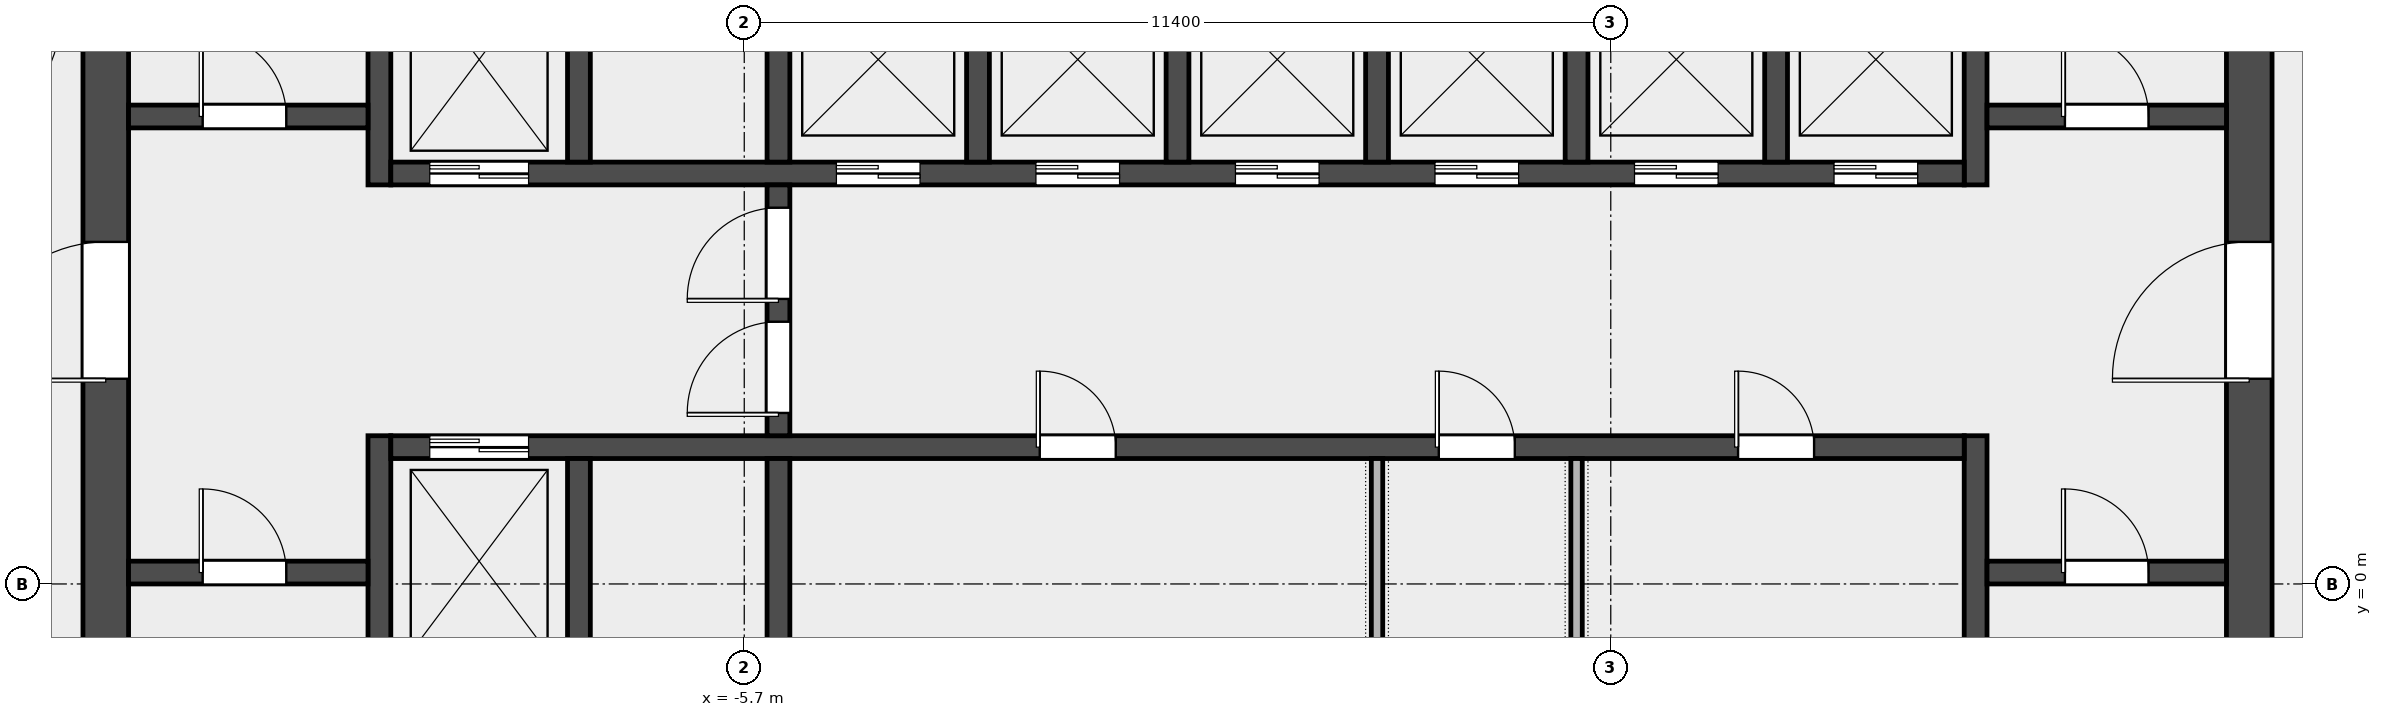
"""IFC4 building model, lengths in metres.
Left out: names, types, materials, properties, quantities, classifications, styles, units other than length and angle.
Written with IfcOpenShell. Run it as: python <this file> out.ifc"""

import sys

from ifc_helpers import new_model, si_unit, direction, frame, frame_2d, origin, place, context, subcontext, project, spatial, rectangle, extrude, element, fill, save


model = new_model("IFC4")
c1 = context("Model", 3, precision=1e-05, world=origin(), true_north=direction((0.0, 1.0)))
c2 = subcontext(c1, "Body", "Model", "MODEL_VIEW")
j1 = project(units=[si_unit("LENGTHUNIT", "METRE"), si_unit("PLANEANGLEUNIT", "RADIAN")], contexts=[c1])
p1 = place(None, origin())
s1 = spatial("IfcSite", under=j1, at=p1, CompositionType="ELEMENT")
p2 = place(p1, origin())
s2 = spatial("IfcBuilding", under=s1, at=p2, CompositionType="ELEMENT")
p3 = place(p2, frame((0.0, 0.0, 251.0)))
s3 = spatial("IfcBuildingStorey", under=s2, at=p3, CompositionType="ELEMENT", Elevation=251.0)
p4 = place(p3, frame((-14.1, -6.6, 0.0), z_axis=(0.0, 0.0, 1.0), x_axis=(0.0, 1.0, 0.0)))
e1 = element("IfcWall", 1, at=p4, inside=s3, PredefinedType="SHEAR", context=c2, shape_type="SweptSolid", body=[
    extrude(rectangle(XDim=19.5, YDim=0.6, at=frame_2d((9.75, 0.0))), origin(), (0.0, 0.0, 1.0), 3.7),
])
p5 = place(p4, frame((9.3, 0.0, 0.0)))
e2 = element("IfcOpeningElement", 2, at=p5, cuts=e1, PredefinedType="OPENING", context=c2, shape_type="SweptSolid", body=[
    extrude(rectangle(XDim=1.8, YDim=2.1, at=frame_2d((0.9, 1.05))), frame((0.0, 0.312, 0.0), z_axis=(0.0, -1.0, 0.0), x_axis=(1.0, 0.0, 0.0)), (0.0, 0.0, 1.0), 0.624),
])
p6 = place(p3, frame((14.1, -6.6, 0.0), z_axis=(0.0, 0.0, 1.0), x_axis=(0.0, 1.0, 0.0)))
e3 = element("IfcWall", 3, at=p6, inside=s3, PredefinedType="SHEAR", context=c2, shape_type="SweptSolid", body=[
    extrude(rectangle(XDim=19.5, YDim=0.6, at=frame_2d((9.75, 0.0))), origin(), (0.0, 0.0, 1.0), 3.7),
])
p7 = place(p6, frame((9.3, 0.0, 0.0)))
e4 = element("IfcOpeningElement", 4, at=p7, cuts=e3, PredefinedType="OPENING", context=c2, shape_type="SweptSolid", body=[
    extrude(rectangle(XDim=1.8, YDim=2.1, at=frame_2d((0.9, 1.05))), frame((0.0, 0.312, 0.0), z_axis=(0.0, -1.0, 0.0), x_axis=(1.0, 0.0, 0.0)), (0.0, 0.0, 1.0), 0.624),
])
p8 = place(p3, frame((-10.5, -6.6, 0.0), z_axis=(0.0, 0.0, 1.0), x_axis=(0.0, 1.0, 0.0)))
e5 = element("IfcWall", 5, at=p8, inside=s3, PredefinedType="SHEAR", context=c2, shape_type="SweptSolid", body=[
    extrude(rectangle(XDim=8.55, YDim=0.3, at=frame_2d((4.275, 0.0))), origin(), (0.0, 0.0, 1.0), 3.7),
])
p9 = place(p3, frame((-10.5, 5.25, 0.0), z_axis=(0.0, 0.0, 1.0), x_axis=(0.0, 1.0, 0.0)))
e6 = element("IfcWall", 6, at=p9, inside=s3, PredefinedType="SHEAR", context=c2, shape_type="SweptSolid", body=[
    extrude(rectangle(XDim=7.65, YDim=0.3, at=frame_2d((3.825, 0.0))), origin(), (0.0, 0.0, 1.0), 3.7),
])
p10 = place(p3, frame((10.5, -6.6, 0.0), z_axis=(0.0, 0.0, 1.0), x_axis=(0.0, 1.0, 0.0)))
e7 = element("IfcWall", 7, at=p10, inside=s3, PredefinedType="SHEAR", context=c2, shape_type="SweptSolid", body=[
    extrude(rectangle(XDim=8.55, YDim=0.3, at=frame_2d((4.275, 0.0))), origin(), (0.0, 0.0, 1.0), 3.7),
])
p11 = place(p3, frame((10.5, 5.25, 0.0), z_axis=(0.0, 0.0, 1.0), x_axis=(0.0, 1.0, 0.0)))
e8 = element("IfcWall", 8, at=p11, inside=s3, PredefinedType="SHEAR", context=c2, shape_type="SweptSolid", body=[
    extrude(rectangle(XDim=7.65, YDim=0.3, at=frame_2d((3.825, 0.0))), origin(), (0.0, 0.0, 1.0), 3.7),
])
p12 = place(p3, frame((-13.8, 0.15, 0.0), z_axis=(0.0, 0.0, 1.0), x_axis=(1.0, 0.0, 0.0)))
e9 = element("IfcWall", 9, at=p12, inside=s3, PredefinedType="SOLIDWALL", context=c2, shape_type="SweptSolid", body=[
    extrude(rectangle(XDim=3.15, YDim=0.3, at=frame_2d((1.575, 0.0))), origin(), (0.0, 0.0, 1.0), 3.7),
])
p13 = place(p12, frame((0.975, 0.0, 0.0)))
e10 = element("IfcOpeningElement", 10, at=p13, cuts=e9, PredefinedType="OPENING", context=c2, shape_type="SweptSolid", body=[
    extrude(rectangle(XDim=1.1, YDim=2.1, at=frame_2d((0.55, 1.05))), frame((0.0, 0.162, 0.0), z_axis=(0.0, -1.0, 0.0), x_axis=(1.0, 0.0, 0.0)), (0.0, 0.0, 1.0), 0.324),
])
p14 = place(p3, frame((-13.8, 6.15, 0.0), z_axis=(0.0, 0.0, 1.0), x_axis=(1.0, 0.0, 0.0)))
e11 = element("IfcWall", 11, at=p14, inside=s3, PredefinedType="SOLIDWALL", context=c2, shape_type="SweptSolid", body=[
    extrude(rectangle(XDim=3.15, YDim=0.3, at=frame_2d((1.575, 0.0))), origin(), (0.0, 0.0, 1.0), 3.7),
])
p15 = place(p14, frame((0.975, 0.0, 0.0)))
e12 = element("IfcOpeningElement", 12, at=p15, cuts=e11, PredefinedType="OPENING", context=c2, shape_type="SweptSolid", body=[
    extrude(rectangle(XDim=1.1, YDim=2.1, at=frame_2d((0.55, 1.05))), frame((0.0, 0.162, 0.0), z_axis=(0.0, -1.0, 0.0), x_axis=(1.0, 0.0, 0.0)), (0.0, 0.0, 1.0), 0.324),
])
p16 = place(p3, frame((10.65, 0.15, 0.0), z_axis=(0.0, 0.0, 1.0), x_axis=(1.0, 0.0, 0.0)))
e13 = element("IfcWall", 13, at=p16, inside=s3, PredefinedType="SOLIDWALL", context=c2, shape_type="SweptSolid", body=[
    extrude(rectangle(XDim=3.15, YDim=0.3, at=frame_2d((1.575, 0.0))), origin(), (0.0, 0.0, 1.0), 3.7),
])
p17 = place(p16, frame((1.025, 0.0, 0.0)))
e14 = element("IfcOpeningElement", 14, at=p17, cuts=e13, PredefinedType="OPENING", context=c2, shape_type="SweptSolid", body=[
    extrude(rectangle(XDim=1.1, YDim=2.1, at=frame_2d((0.55, 1.05))), frame((0.0, 0.162, 0.0), z_axis=(0.0, -1.0, 0.0), x_axis=(1.0, 0.0, 0.0)), (0.0, 0.0, 1.0), 0.324),
])
p18 = place(p3, frame((10.65, 6.15, 0.0), z_axis=(0.0, 0.0, 1.0), x_axis=(1.0, 0.0, 0.0)))
e15 = element("IfcWall", 15, at=p18, inside=s3, PredefinedType="SOLIDWALL", context=c2, shape_type="SweptSolid", body=[
    extrude(rectangle(XDim=3.15, YDim=0.3, at=frame_2d((1.575, 0.0))), origin(), (0.0, 0.0, 1.0), 3.7),
])
p19 = place(p18, frame((1.025, 0.0, 0.0)))
e16 = element("IfcOpeningElement", 16, at=p19, cuts=e15, PredefinedType="OPENING", context=c2, shape_type="SweptSolid", body=[
    extrude(rectangle(XDim=1.1, YDim=2.1, at=frame_2d((0.55, 1.05))), frame((0.0, 0.162, 0.0), z_axis=(0.0, -1.0, 0.0), x_axis=(1.0, 0.0, 0.0)), (0.0, 0.0, 1.0), 0.324),
])
p20 = place(p3, frame((-10.35, 1.8, 0.0), z_axis=(0.0, 0.0, 1.0), x_axis=(1.0, 0.0, 0.0)))
e17 = element("IfcWall", 17, at=p20, inside=s3, PredefinedType="SOLIDWALL", context=c2, shape_type="SweptSolid", body=[
    extrude(rectangle(XDim=20.7, YDim=0.3, at=frame_2d((10.35, 0.0))), origin(), (0.0, 0.0, 1.0), 3.7),
])
p21 = place(p20, frame((0.512, 0.0, 0.0)))
e18 = element("IfcOpeningElement", 18, at=p21, cuts=e17, PredefinedType="OPENING", context=c2, shape_type="SweptSolid", body=[
    extrude(rectangle(XDim=1.3, YDim=2.1, at=frame_2d((0.65, 1.05))), frame((0.0, 0.162, 0.0), z_axis=(0.0, -1.0, 0.0), x_axis=(1.0, 0.0, 0.0)), (0.0, 0.0, 1.0), 0.324),
])
p22 = place(p20, frame((8.538, 0.0, 0.0)))
e19 = element("IfcOpeningElement", 19, at=p22, cuts=e17, PredefinedType="OPENING", context=c2, shape_type="SweptSolid", body=[
    extrude(rectangle(XDim=1.0, YDim=2.1, at=frame_2d((0.5, 1.05))), frame((0.0, 0.162, 0.0), z_axis=(0.0, -1.0, 0.0), x_axis=(1.0, 0.0, 0.0)), (0.0, 0.0, 1.0), 0.324),
])
p23 = place(p20, frame((13.788, 0.0, 0.0)))
e20 = element("IfcOpeningElement", 20, at=p23, cuts=e17, PredefinedType="OPENING", context=c2, shape_type="SweptSolid", body=[
    extrude(rectangle(XDim=1.0, YDim=2.1, at=frame_2d((0.5, 1.05))), frame((0.0, 0.162, 0.0), z_axis=(0.0, -1.0, 0.0), x_axis=(1.0, 0.0, 0.0)), (0.0, 0.0, 1.0), 0.324),
])
p24 = place(p20, frame((17.725, 0.0, 0.0)))
e21 = element("IfcOpeningElement", 21, at=p24, cuts=e17, PredefinedType="OPENING", context=c2, shape_type="SweptSolid", body=[
    extrude(rectangle(XDim=1.0, YDim=2.1, at=frame_2d((0.5, 1.05))), frame((0.0, 0.162, 0.0), z_axis=(0.0, -1.0, 0.0), x_axis=(1.0, 0.0, 0.0)), (0.0, 0.0, 1.0), 0.324),
])
p25 = place(p3, frame((-10.35, 5.4, 0.0), z_axis=(0.0, 0.0, 1.0), x_axis=(1.0, 0.0, 0.0)))
e22 = element("IfcWall", 22, at=p25, inside=s3, PredefinedType="SOLIDWALL", context=c2, shape_type="SweptSolid", body=[
    extrude(rectangle(XDim=20.7, YDim=0.3, at=frame_2d((10.35, 0.0))), origin(), (0.0, 0.0, 1.0), 3.7),
])
p26 = place(p25, frame((0.512, 0.0, 0.0)))
e23 = element("IfcOpeningElement", 23, at=p26, cuts=e22, PredefinedType="OPENING", context=c2, shape_type="SweptSolid", body=[
    extrude(rectangle(XDim=1.3, YDim=2.1, at=frame_2d((0.65, 1.05))), frame((0.0, 0.162, 0.0), z_axis=(0.0, -1.0, 0.0), x_axis=(1.0, 0.0, 0.0)), (0.0, 0.0, 1.0), 0.324),
])
p27 = place(p25, frame((5.863, 0.0, 0.0)))
e24 = element("IfcOpeningElement", 24, at=p27, cuts=e22, PredefinedType="OPENING", context=c2, shape_type="SweptSolid", body=[
    extrude(rectangle(XDim=1.1, YDim=2.1, at=frame_2d((0.55, 1.05))), frame((0.0, 0.162, 0.0), z_axis=(0.0, -1.0, 0.0), x_axis=(1.0, 0.0, 0.0)), (0.0, 0.0, 1.0), 0.324),
])
p28 = place(p25, frame((8.488, 0.0, 0.0)))
e25 = element("IfcOpeningElement", 25, at=p28, cuts=e22, PredefinedType="OPENING", context=c2, shape_type="SweptSolid", body=[
    extrude(rectangle(XDim=1.1, YDim=2.1, at=frame_2d((0.55, 1.05))), frame((0.0, 0.162, 0.0), z_axis=(0.0, -1.0, 0.0), x_axis=(1.0, 0.0, 0.0)), (0.0, 0.0, 1.0), 0.324),
])
p29 = place(p25, frame((11.113, 0.0, 0.0)))
e26 = element("IfcOpeningElement", 26, at=p29, cuts=e22, PredefinedType="OPENING", context=c2, shape_type="SweptSolid", body=[
    extrude(rectangle(XDim=1.1, YDim=2.1, at=frame_2d((0.55, 1.05))), frame((0.0, 0.162, 0.0), z_axis=(0.0, -1.0, 0.0), x_axis=(1.0, 0.0, 0.0)), (0.0, 0.0, 1.0), 0.324),
])
p30 = place(p25, frame((13.738, 0.0, 0.0)))
e27 = element("IfcOpeningElement", 27, at=p30, cuts=e22, PredefinedType="OPENING", context=c2, shape_type="SweptSolid", body=[
    extrude(rectangle(XDim=1.1, YDim=2.1, at=frame_2d((0.55, 1.05))), frame((0.0, 0.162, 0.0), z_axis=(0.0, -1.0, 0.0), x_axis=(1.0, 0.0, 0.0)), (0.0, 0.0, 1.0), 0.324),
])
p31 = place(p25, frame((16.363, 0.0, 0.0)))
e28 = element("IfcOpeningElement", 28, at=p31, cuts=e22, PredefinedType="OPENING", context=c2, shape_type="SweptSolid", body=[
    extrude(rectangle(XDim=1.1, YDim=2.1, at=frame_2d((0.55, 1.05))), frame((0.0, 0.162, 0.0), z_axis=(0.0, -1.0, 0.0), x_axis=(1.0, 0.0, 0.0)), (0.0, 0.0, 1.0), 0.324),
])
p32 = place(p25, frame((18.988, 0.0, 0.0)))
e29 = element("IfcOpeningElement", 29, at=p32, cuts=e22, PredefinedType="OPENING", context=c2, shape_type="SweptSolid", body=[
    extrude(rectangle(XDim=1.1, YDim=2.1, at=frame_2d((0.55, 1.05))), frame((0.0, 0.162, 0.0), z_axis=(0.0, -1.0, 0.0), x_axis=(1.0, 0.0, 0.0)), (0.0, 0.0, 1.0), 0.324),
])
for number, where, z_axis, x_axis in (
    (30, (-7.875, -1.05, 0.0), (0.0, 0.0, 1.0), (0.0, 1.0, 0.0)),
    (31, (-5.25, -1.05, 0.0), (0.0, 0.0, 1.0), (0.0, 1.0, 0.0)),
    (32, (-7.875, 5.55, 0.0), (0.0, 0.0, 1.0), (0.0, 1.0, 0.0)),
    (33, (-5.25, 5.55, 0.0), (0.0, 0.0, 1.0), (0.0, 1.0, 0.0)),
    (34, (-2.625, 5.55, 0.0), (0.0, 0.0, 1.0), (0.0, 1.0, 0.0)),
    (35, (0.0, 5.55, 0.0), (0.0, 0.0, 1.0), (0.0, 1.0, 0.0)),
    (36, (2.625, 5.55, 0.0), (0.0, 0.0, 1.0), (0.0, 1.0, 0.0)),
    (37, (5.25, 5.55, 0.0), (0.0, 0.0, 1.0), (0.0, 1.0, 0.0)),
    (38, (7.875, 5.55, 0.0), (0.0, 0.0, 1.0), (0.0, 1.0, 0.0)),
):
    element("IfcWall", number, at=place(p3, frame(where, z_axis=z_axis, x_axis=x_axis)), inside=s3, PredefinedType="SOLIDWALL", context=c2, shape_type="SweptSolid", body=[
        extrude(rectangle(XDim=2.7, YDim=0.3, at=frame_2d((1.35, 0.0))), origin(), (0.0, 0.0, 1.0), 3.7),
    ])
p33 = place(p3, frame((-5.25, 1.95, 0.0), z_axis=(0.0, 0.0, 1.0), x_axis=(0.0, 1.0, 0.0)))
e39 = element("IfcWall", 39, at=p33, inside=s3, PredefinedType="SOLIDWALL", context=c2, shape_type="SweptSolid", body=[
    extrude(rectangle(XDim=3.3, YDim=0.3, at=frame_2d((1.65, 0.0))), origin(), (0.0, 0.0, 1.0), 3.7),
])
p34 = place(p33, frame((0.3, 0.0, 0.0)))
e40 = element("IfcOpeningElement", 40, at=p34, cuts=e39, PredefinedType="OPENING", context=c2, shape_type="SweptSolid", body=[
    extrude(rectangle(XDim=1.2, YDim=2.1, at=frame_2d((0.6, 1.05))), frame((0.0, 0.162, 0.0), z_axis=(0.0, -1.0, 0.0), x_axis=(1.0, 0.0, 0.0)), (0.0, 0.0, 1.0), 0.324),
])
p35 = place(p33, frame((1.8, 0.0, 0.0)))
e41 = element("IfcOpeningElement", 41, at=p35, cuts=e39, PredefinedType="OPENING", context=c2, shape_type="SweptSolid", body=[
    extrude(rectangle(XDim=1.2, YDim=2.1, at=frame_2d((0.6, 1.05))), frame((0.0, 0.162, 0.0), z_axis=(0.0, -1.0, 0.0), x_axis=(1.0, 0.0, 0.0)), (0.0, 0.0, 1.0), 0.324),
])
for number, where, z_axis, x_axis in (
    (42, (2.625, -1.05, 0.0), (0.0, 0.0, 1.0), (0.0, 1.0, 0.0)),
    (43, (5.25, -1.05, 0.0), (0.0, 0.0, 1.0), (0.0, 1.0, 0.0)),
):
    element("IfcWall", number, at=place(p3, frame(where, z_axis=z_axis, x_axis=x_axis)), inside=s3, PredefinedType="PARTITIONING", context=c2, shape_type="SweptSolid", body=[
        extrude(rectangle(XDim=2.7, YDim=0.15, at=frame_2d((1.35, 0.0))), origin(), (0.0, 0.0, 1.0), 3.7),
    ])
p36 = place(p13, origin())
e44 = element("IfcDoor", 44, at=p36, inside=s3, OperationType="SINGLE_SWING_LEFT", PredefinedType="DOOR", context=c2, shape_type="SweptSolid", body=[
    extrude(rectangle(XDim=1.1, YDim=2.1, at=frame_2d((0.55, 1.05))), frame((0.0, 0.025, 0.0), z_axis=(0.0, -1.0, 0.0), x_axis=(1.0, 0.0, 0.0)), (0.0, 0.0, 1.0), 0.05),
])
fill(e10, e44)
p37 = place(p15, origin())
e45 = element("IfcDoor", 45, at=p37, inside=s3, OperationType="SINGLE_SWING_LEFT", PredefinedType="DOOR", context=c2, shape_type="SweptSolid", body=[
    extrude(rectangle(XDim=1.1, YDim=2.1, at=frame_2d((0.55, 1.05))), frame((0.0, 0.025, 0.0), z_axis=(0.0, -1.0, 0.0), x_axis=(1.0, 0.0, 0.0)), (0.0, 0.0, 1.0), 0.05),
])
fill(e12, e45)
p38 = place(p17, origin())
e46 = element("IfcDoor", 46, at=p38, inside=s3, OperationType="SINGLE_SWING_RIGHT", PredefinedType="DOOR", context=c2, shape_type="SweptSolid", body=[
    extrude(rectangle(XDim=1.1, YDim=2.1, at=frame_2d((0.55, 1.05))), frame((0.0, 0.025, 0.0), z_axis=(0.0, -1.0, 0.0), x_axis=(1.0, 0.0, 0.0)), (0.0, 0.0, 1.0), 0.05),
])
fill(e14, e46)
p39 = place(p19, origin())
e47 = element("IfcDoor", 47, at=p39, inside=s3, OperationType="SINGLE_SWING_RIGHT", PredefinedType="DOOR", context=c2, shape_type="SweptSolid", body=[
    extrude(rectangle(XDim=1.1, YDim=2.1, at=frame_2d((0.55, 1.05))), frame((0.0, 0.025, 0.0), z_axis=(0.0, -1.0, 0.0), x_axis=(1.0, 0.0, 0.0)), (0.0, 0.0, 1.0), 0.05),
])
fill(e16, e47)
p40 = place(p5, origin())
e48 = element("IfcDoor", 48, at=p40, inside=s3, OperationType="DOUBLE_DOOR_SINGLE_SWING", PredefinedType="DOOR", context=c2, shape_type="SweptSolid", body=[
    extrude(rectangle(XDim=1.8, YDim=2.1, at=frame_2d((0.9, 1.05))), frame((0.0, 0.025, 0.0), z_axis=(0.0, -1.0, 0.0), x_axis=(1.0, 0.0, 0.0)), (0.0, 0.0, 1.0), 0.05),
])
fill(e2, e48)
p41 = place(p7, origin())
e49 = element("IfcDoor", 49, at=p41, inside=s3, OperationType="DOUBLE_DOOR_SINGLE_SWING", PredefinedType="DOOR", context=c2, shape_type="SweptSolid", body=[
    extrude(rectangle(XDim=1.8, YDim=2.1, at=frame_2d((0.9, 1.05))), frame((0.0, 0.025, 0.0), z_axis=(0.0, -1.0, 0.0), x_axis=(1.0, 0.0, 0.0)), (0.0, 0.0, 1.0), 0.05),
])
fill(e4, e49)
p42 = place(p34, origin())
e50 = element("IfcDoor", 50, at=p42, inside=s3, OperationType="SINGLE_SWING_LEFT", PredefinedType="DOOR", context=c2, shape_type="SweptSolid", body=[
    extrude(rectangle(XDim=1.2, YDim=2.1, at=frame_2d((0.6, 1.05))), frame((0.0, 0.025, 0.0), z_axis=(0.0, -1.0, 0.0), x_axis=(1.0, 0.0, 0.0)), (0.0, 0.0, 1.0), 0.05),
])
fill(e40, e50)
p43 = place(p35, origin())
e51 = element("IfcDoor", 51, at=p43, inside=s3, OperationType="SINGLE_SWING_RIGHT", PredefinedType="DOOR", context=c2, shape_type="SweptSolid", body=[
    extrude(rectangle(XDim=1.2, YDim=2.1, at=frame_2d((0.6, 1.05))), frame((0.0, 0.025, 0.0), z_axis=(0.0, -1.0, 0.0), x_axis=(1.0, 0.0, 0.0)), (0.0, 0.0, 1.0), 0.05),
])
fill(e41, e51)
p44 = place(p21, origin())
e52 = element("IfcDoor", 52, at=p44, inside=s3, OperationType="DOUBLE_DOOR_SLIDING", PredefinedType="DOOR", context=c2, shape_type="SweptSolid", body=[
    extrude(rectangle(XDim=1.3, YDim=2.1, at=frame_2d((0.65, 1.05))), frame((0.0, 0.025, 0.0), z_axis=(0.0, -1.0, 0.0), x_axis=(1.0, 0.0, 0.0)), (0.0, 0.0, 1.0), 0.05),
])
fill(e18, e52)
p45 = place(p26, origin())
e53 = element("IfcDoor", 53, at=p45, inside=s3, OperationType="DOUBLE_DOOR_SLIDING", PredefinedType="DOOR", context=c2, shape_type="SweptSolid", body=[
    extrude(rectangle(XDim=1.3, YDim=2.1, at=frame_2d((0.65, 1.05))), frame((0.0, 0.025, 0.0), z_axis=(0.0, -1.0, 0.0), x_axis=(1.0, 0.0, 0.0)), (0.0, 0.0, 1.0), 0.05),
])
fill(e23, e53)
p46 = place(p27, origin())
e54 = element("IfcDoor", 54, at=p46, inside=s3, OperationType="DOUBLE_DOOR_SLIDING", PredefinedType="DOOR", context=c2, shape_type="SweptSolid", body=[
    extrude(rectangle(XDim=1.1, YDim=2.1, at=frame_2d((0.55, 1.05))), frame((0.0, 0.025, 0.0), z_axis=(0.0, -1.0, 0.0), x_axis=(1.0, 0.0, 0.0)), (0.0, 0.0, 1.0), 0.05),
])
fill(e24, e54)
p47 = place(p28, origin())
e55 = element("IfcDoor", 55, at=p47, inside=s3, OperationType="DOUBLE_DOOR_SLIDING", PredefinedType="DOOR", context=c2, shape_type="SweptSolid", body=[
    extrude(rectangle(XDim=1.1, YDim=2.1, at=frame_2d((0.55, 1.05))), frame((0.0, 0.025, 0.0), z_axis=(0.0, -1.0, 0.0), x_axis=(1.0, 0.0, 0.0)), (0.0, 0.0, 1.0), 0.05),
])
fill(e25, e55)
p48 = place(p29, origin())
e56 = element("IfcDoor", 56, at=p48, inside=s3, OperationType="DOUBLE_DOOR_SLIDING", PredefinedType="DOOR", context=c2, shape_type="SweptSolid", body=[
    extrude(rectangle(XDim=1.1, YDim=2.1, at=frame_2d((0.55, 1.05))), frame((0.0, 0.025, 0.0), z_axis=(0.0, -1.0, 0.0), x_axis=(1.0, 0.0, 0.0)), (0.0, 0.0, 1.0), 0.05),
])
fill(e26, e56)
p49 = place(p30, origin())
e57 = element("IfcDoor", 57, at=p49, inside=s3, OperationType="DOUBLE_DOOR_SLIDING", PredefinedType="DOOR", context=c2, shape_type="SweptSolid", body=[
    extrude(rectangle(XDim=1.1, YDim=2.1, at=frame_2d((0.55, 1.05))), frame((0.0, 0.025, 0.0), z_axis=(0.0, -1.0, 0.0), x_axis=(1.0, 0.0, 0.0)), (0.0, 0.0, 1.0), 0.05),
])
fill(e27, e57)
p50 = place(p31, origin())
e58 = element("IfcDoor", 58, at=p50, inside=s3, OperationType="DOUBLE_DOOR_SLIDING", PredefinedType="DOOR", context=c2, shape_type="SweptSolid", body=[
    extrude(rectangle(XDim=1.1, YDim=2.1, at=frame_2d((0.55, 1.05))), frame((0.0, 0.025, 0.0), z_axis=(0.0, -1.0, 0.0), x_axis=(1.0, 0.0, 0.0)), (0.0, 0.0, 1.0), 0.05),
])
fill(e28, e58)
p51 = place(p32, origin())
e59 = element("IfcDoor", 59, at=p51, inside=s3, OperationType="DOUBLE_DOOR_SLIDING", PredefinedType="DOOR", context=c2, shape_type="SweptSolid", body=[
    extrude(rectangle(XDim=1.1, YDim=2.1, at=frame_2d((0.55, 1.05))), frame((0.0, 0.025, 0.0), z_axis=(0.0, -1.0, 0.0), x_axis=(1.0, 0.0, 0.0)), (0.0, 0.0, 1.0), 0.05),
])
fill(e29, e59)
p52 = place(p22, origin())
e60 = element("IfcDoor", 60, at=p52, inside=s3, OperationType="SINGLE_SWING_LEFT", PredefinedType="DOOR", context=c2, shape_type="SweptSolid", body=[
    extrude(rectangle(XDim=1.0, YDim=2.1, at=frame_2d((0.5, 1.05))), frame((0.0, 0.025, 0.0), z_axis=(0.0, -1.0, 0.0), x_axis=(1.0, 0.0, 0.0)), (0.0, 0.0, 1.0), 0.05),
])
fill(e19, e60)
p53 = place(p23, origin())
e61 = element("IfcDoor", 61, at=p53, inside=s3, OperationType="SINGLE_SWING_LEFT", PredefinedType="DOOR", context=c2, shape_type="SweptSolid", body=[
    extrude(rectangle(XDim=1.0, YDim=2.1, at=frame_2d((0.5, 1.05))), frame((0.0, 0.025, 0.0), z_axis=(0.0, -1.0, 0.0), x_axis=(1.0, 0.0, 0.0)), (0.0, 0.0, 1.0), 0.05),
])
fill(e20, e61)
p54 = place(p24, origin())
e62 = element("IfcDoor", 62, at=p54, inside=s3, OperationType="SINGLE_SWING_LEFT", PredefinedType="DOOR", context=c2, shape_type="SweptSolid", body=[
    extrude(rectangle(XDim=1.0, YDim=2.1, at=frame_2d((0.5, 1.05))), frame((0.0, 0.025, 0.0), z_axis=(0.0, -1.0, 0.0), x_axis=(1.0, 0.0, 0.0)), (0.0, 0.0, 1.0), 0.05),
])
fill(e21, e62)
save(model, sys.argv[1])
